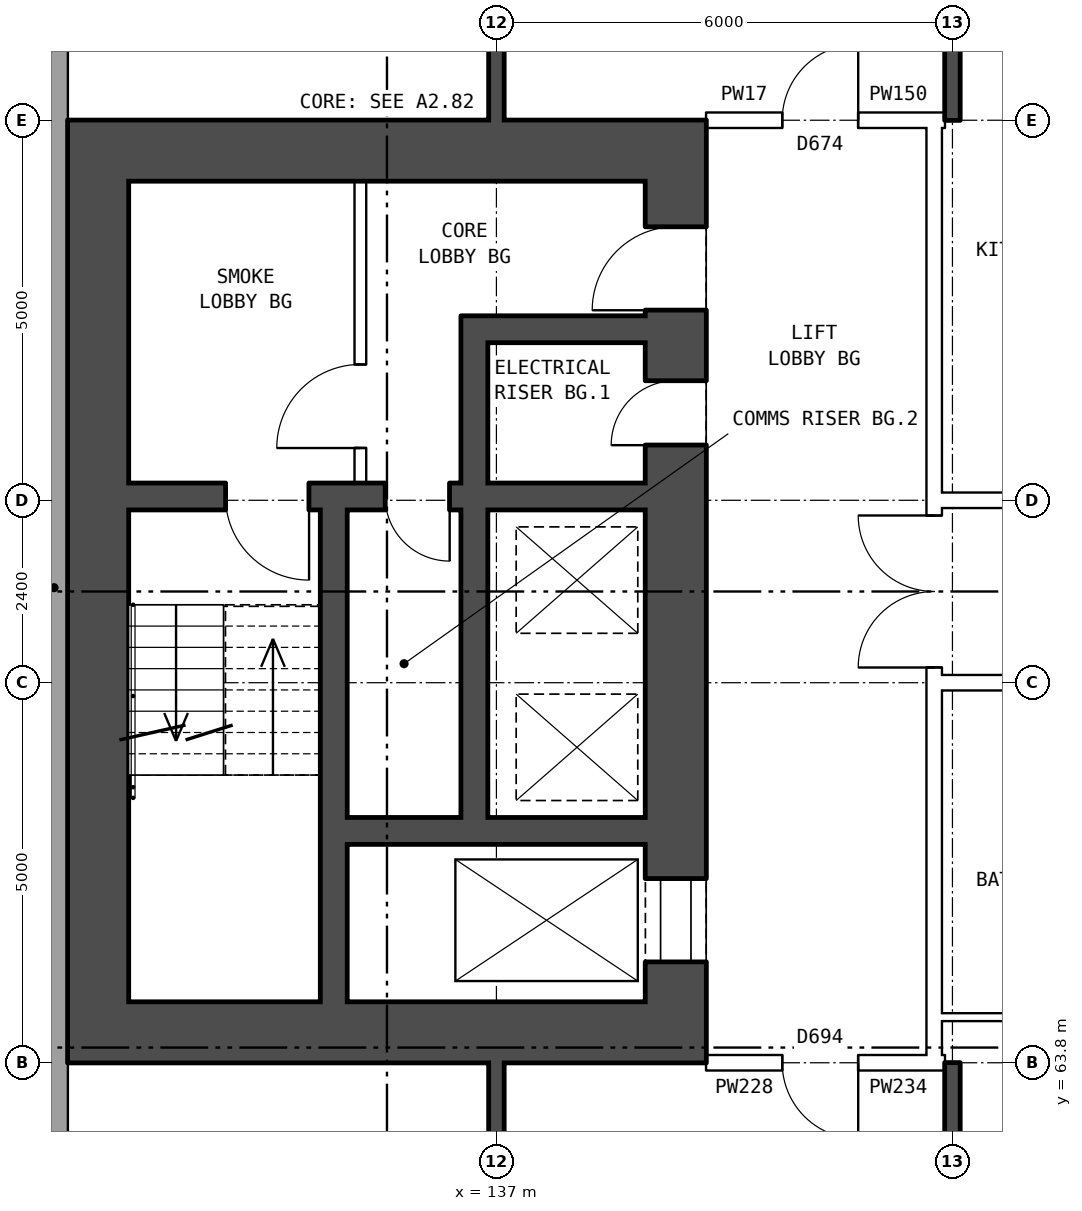
"""IFC4 building model, lengths in metres.
Left out: names, types, materials, properties, quantities, classifications, styles, units other than length and angle.
Written with IfcOpenShell. Run it as: python <this file> out.ifc"""

import sys

from ifc_helpers import new_model, si_unit, direction, frame, frame_2d, origin, place, context, subcontext, project, spatial, rectangle, extrude, element, fill, save


model = new_model("IFC4")
c1 = context("Model", 3, precision=1e-05, world=origin(), true_north=direction((0.0, 1.0)))
c2 = subcontext(c1, "Body", "Model", "MODEL_VIEW")
j1 = project(units=[si_unit("LENGTHUNIT", "METRE"), si_unit("PLANEANGLEUNIT", "RADIAN")], contexts=[c1])
p1 = place(None, origin())
s1 = spatial("IfcSite", under=j1, at=p1, CompositionType="ELEMENT")
p2 = place(p1, origin())
s2 = spatial("IfcBuilding", under=s1, at=p2, CompositionType="ELEMENT")
p3 = place(p2, frame((0.0, 0.0, 47.4)))
s3 = spatial("IfcBuildingStorey", under=s2, at=p3, CompositionType="ELEMENT", Elevation=47.4)
p4 = place(p3, frame((131.18, 82.925, 0.0), z_axis=(0.0, 0.0, 1.0), x_axis=(0.0, -1.0, 0.0)))
e1 = element("IfcWall", 1, at=p4, inside=s3, PredefinedType="STANDARD", context=c2, shape_type="SweptSolid", body=[
    extrude(rectangle(XDim=25.851, YDim=0.36, at=frame_2d((12.925, 0.0))), origin(), (0.0, 0.0, 1.0), 2.85),
])
p5 = place(p4, frame((1.625, 0.0, 0.8)))
e2 = element("IfcOpeningElement", 2, at=p5, cuts=e1, PredefinedType="OPENING", context=c2, shape_type="SweptSolid", body=[
    extrude(rectangle(XDim=1.6, YDim=1.8, at=frame_2d((0.8, 0.9))), frame((0.0, 0.19, 0.0), z_axis=(0.0, -1.0, 0.0), x_axis=(1.0, 0.0, 0.0)), (0.0, 0.0, 1.0), 0.38),
])
p6 = place(p4, frame((3.525, 0.0, 1.7)))
e3 = element("IfcOpeningElement", 3, at=p6, cuts=e1, PredefinedType="OPENING", context=c2, shape_type="SweptSolid", body=[
    extrude(rectangle(XDim=1.4, YDim=0.9, at=frame_2d((0.7, 0.45))), frame((0.0, 0.19, 0.0), z_axis=(0.0, -1.0, 0.0), x_axis=(1.0, 0.0, 0.0)), (0.0, 0.0, 1.0), 0.38),
])
p7 = place(p4, frame((20.825, 0.0, 1.7)))
e4 = element("IfcOpeningElement", 4, at=p7, cuts=e1, PredefinedType="OPENING", context=c2, shape_type="SweptSolid", body=[
    extrude(rectangle(XDim=1.4, YDim=0.9, at=frame_2d((0.7, 0.45))), frame((0.0, 0.19, 0.0), z_axis=(0.0, -1.0, 0.0), x_axis=(1.0, 0.0, 0.0)), (0.0, 0.0, 1.0), 0.38),
])
p8 = place(p4, frame((22.625, 0.0, 0.8)))
e5 = element("IfcOpeningElement", 5, at=p8, cuts=e1, PredefinedType="OPENING", context=c2, shape_type="SweptSolid", body=[
    extrude(rectangle(XDim=1.6, YDim=1.8, at=frame_2d((0.8, 0.9))), frame((0.0, 0.19, 0.0), z_axis=(0.0, -1.0, 0.0), x_axis=(1.0, 0.0, 0.0)), (0.0, 0.0, 1.0), 0.38),
])
p9 = place(p3, frame((139.36, 64.6, 0.0), z_axis=(0.0, 0.0, 1.0), x_axis=(0.0, 1.0, 0.0)))
e6 = element("IfcWall", 6, at=p9, inside=s3, PredefinedType="SHEAR", context=c2, shape_type="SweptSolid", body=[
    extrude(rectangle(XDim=10.8, YDim=0.8, at=frame_2d((5.4, 0.0))), origin(), (0.0, 0.0, 1.0), 2.85),
])
p10 = place(p9, frame((0.525, 0.0, 0.0)))
e7 = element("IfcOpeningElement", 7, at=p10, cuts=e6, PredefinedType="OPENING", context=c2, shape_type="SweptSolid", body=[
    extrude(rectangle(XDim=1.1, YDim=2.1, at=frame_2d((0.55, 1.05))), frame((0.0, 0.41, 0.0), z_axis=(0.0, -1.0, 0.0), x_axis=(1.0, 0.0, 0.0)), (0.0, 0.0, 1.0), 0.82),
])
p11 = place(p9, frame((9.1, 0.0, 0.0)))
e8 = element("IfcOpeningElement", 8, at=p11, cuts=e6, PredefinedType="OPENING", context=c2, shape_type="SweptSolid", body=[
    extrude(rectangle(XDim=1.1, YDim=2.1, at=frame_2d((0.55, 1.05))), frame((0.0, 0.41, 0.0), z_axis=(0.0, -1.0, 0.0), x_axis=(1.0, 0.0, 0.0)), (0.0, 0.0, 1.0), 0.82),
])
p12 = place(p9, frame((7.325, 0.0, 0.0)))
e9 = element("IfcOpeningElement", 9, at=p12, cuts=e6, PredefinedType="OPENING", context=c2, shape_type="SweptSolid", body=[
    extrude(rectangle(XDim=0.85, YDim=2.1, at=frame_2d((0.425, 1.05))), frame((0.0, 0.41, 0.0), z_axis=(0.0, -1.0, 0.0), x_axis=(1.0, 0.0, 0.0)), (0.0, 0.0, 1.0), 0.82),
])
p13 = place(p3, frame((131.76, 64.6, 0.0), z_axis=(0.0, 0.0, 1.0), x_axis=(0.0, 1.0, 0.0)))
e10 = element("IfcWall", 10, at=p13, inside=s3, PredefinedType="SHEAR", context=c2, shape_type="SweptSolid", body=[
    extrude(rectangle(XDim=10.8, YDim=0.8, at=frame_2d((5.4, 0.0))), origin(), (0.0, 0.0, 1.0), 2.85),
])
for number, where, z_axis, x_axis in (
    (11, (139.76, 64.2, 0.0), (0.0, 0.0, 1.0), (-1.0, 0.0, 0.0)),
    (12, (139.76, 75.8, 0.0), (0.0, 0.0, 1.0), (-1.0, 0.0, 0.0)),
):
    element("IfcWall", number, at=place(p3, frame(where, z_axis=z_axis, x_axis=x_axis)), inside=s3, PredefinedType="SHEAR", context=c2, shape_type="SweptSolid", body=[
        extrude(rectangle(XDim=8.4, YDim=0.8, at=frame_2d((4.2, 0.0))), origin(), (0.0, 0.0, 1.0), 2.85),
    ])
p14 = place(p3, frame((138.96, 66.85, 0.0), z_axis=(0.0, 0.0, 1.0), x_axis=(-1.0, 0.0, 0.0)))
e13 = element("IfcWall", 13, at=p14, inside=s3, PredefinedType="SHEAR", context=c2, shape_type="SweptSolid", body=[
    extrude(rectangle(XDim=3.925, YDim=0.35, at=frame_2d((1.962, 0.0))), origin(), (0.0, 0.0, 1.0), 2.85),
])
p15 = place(p3, frame((138.96, 71.25, 0.0), z_axis=(0.0, 0.0, 1.0), x_axis=(-1.0, 0.0, 0.0)))
e14 = element("IfcWall", 14, at=p15, inside=s3, PredefinedType="SHEAR", context=c2, shape_type="SweptSolid", body=[
    extrude(rectangle(XDim=6.8, YDim=0.35, at=frame_2d((3.4, 0.0))), origin(), (0.0, 0.0, 1.0), 2.85),
])
p16 = place(p15, frame((4.425, 0.0, 0.0)))
e15 = element("IfcOpeningElement", 15, at=p16, cuts=e14, PredefinedType="OPENING", context=c2, shape_type="SweptSolid", body=[
    extrude(rectangle(XDim=1.1, YDim=2.1, at=frame_2d((0.55, 1.05))), frame((0.0, 0.185, 0.0), z_axis=(0.0, -1.0, 0.0), x_axis=(1.0, 0.0, 0.0)), (0.0, 0.0, 1.0), 0.37),
])
p17 = place(p15, frame((2.575, 0.0, 0.0)))
e16 = element("IfcOpeningElement", 16, at=p17, cuts=e14, PredefinedType="OPENING", context=c2, shape_type="SweptSolid", body=[
    extrude(rectangle(XDim=0.85, YDim=2.1, at=frame_2d((0.425, 1.05))), frame((0.0, 0.185, 0.0), z_axis=(0.0, -1.0, 0.0), x_axis=(1.0, 0.0, 0.0)), (0.0, 0.0, 1.0), 0.37),
])
p18 = place(p3, frame((138.96, 73.45, 0.0), z_axis=(0.0, 0.0, 1.0), x_axis=(-1.0, 0.0, 0.0)))
e17 = element("IfcWall", 17, at=p18, inside=s3, PredefinedType="SHEAR", context=c2, shape_type="SweptSolid", body=[
    extrude(rectangle(XDim=2.075, YDim=0.35, at=frame_2d((1.038, 0.0))), origin(), (0.0, 0.0, 1.0), 2.85),
])
p19 = place(p3, frame((136.71, 67.025, 0.0), z_axis=(0.0, 0.0, 1.0), x_axis=(0.0, 1.0, 0.0)))
e18 = element("IfcWall", 18, at=p19, inside=s3, PredefinedType="SHEAR", context=c2, shape_type="SweptSolid", body=[
    extrude(rectangle(XDim=4.05, YDim=0.35, at=frame_2d((2.025, 0.0))), origin(), (0.0, 0.0, 1.0), 2.85),
])
p20 = place(p3, frame((136.71, 71.425, 0.0), z_axis=(0.0, 0.0, 1.0), x_axis=(0.0, 1.0, 0.0)))
e19 = element("IfcWall", 19, at=p20, inside=s3, PredefinedType="SHEAR", context=c2, shape_type="SweptSolid", body=[
    extrude(rectangle(XDim=2.2, YDim=0.35, at=frame_2d((1.1, 0.0))), origin(), (0.0, 0.0, 1.0), 2.85),
])
p21 = place(p3, frame((135.21, 71.425, 0.0), z_axis=(0.0, 0.0, 1.0), x_axis=(0.0, 1.0, 0.0)))
e20 = element("IfcWall", 20, at=p21, inside=s3, PredefinedType="PARTITIONING", context=c2, shape_type="SweptSolid", body=[
    extrude(rectangle(XDim=3.975, YDim=0.15, at=frame_2d((1.987, 0.0))), origin(), (0.0, 0.0, 1.0), 2.85),
])
p22 = place(p21, frame((0.462, 0.0, 0.0)))
e21 = element("IfcOpeningElement", 21, at=p22, cuts=e20, PredefinedType="OPENING", context=c2, shape_type="SweptSolid", body=[
    extrude(rectangle(XDim=1.1, YDim=2.1, at=frame_2d((0.55, 1.05))), frame((0.0, 0.085, 0.0), z_axis=(0.0, -1.0, 0.0), x_axis=(1.0, 0.0, 0.0)), (0.0, 0.0, 1.0), 0.17),
])
p23 = place(p3, frame((134.86, 64.6, 0.0), z_axis=(0.0, 0.0, 1.0), x_axis=(0.0, 1.0, 0.0)))
e22 = element("IfcWall", 22, at=p23, inside=s3, PredefinedType="SHEAR", context=c2, shape_type="SweptSolid", body=[
    extrude(rectangle(XDim=6.475, YDim=0.35, at=frame_2d((3.237, 0.0))), origin(), (0.0, 0.0, 1.0), 2.85),
])
p24 = place(p3, frame((142.76, 63.9, 0.0), z_axis=(0.0, 0.0, 1.0), x_axis=(0.0, 1.0, 0.0)))
e23 = element("IfcWall", 23, at=p24, inside=s3, PredefinedType="PARTITIONING", context=c2, shape_type="SweptSolid", body=[
    extrude(rectangle(XDim=12.2, YDim=0.2, at=frame_2d((6.1, 0.0))), origin(), (0.0, 0.0, 1.0), 2.85),
])
p25 = place(p24, frame((5.1, 0.0, 0.0)))
e24 = element("IfcOpeningElement", 24, at=p25, cuts=e23, PredefinedType="OPENING", context=c2, shape_type="SweptSolid", body=[
    extrude(rectangle(XDim=2.0, YDim=2.1, at=frame_2d((1.0, 1.05))), frame((0.0, 0.11, 0.0), z_axis=(0.0, -1.0, 0.0), x_axis=(1.0, 0.0, 0.0)), (0.0, 0.0, 1.0), 0.22),
])
p26 = place(p3, frame((139.76, 63.8, 0.0), z_axis=(0.0, 0.0, 1.0), x_axis=(1.0, 0.0, 0.0)))
e25 = element("IfcWall", 25, at=p26, inside=s3, PredefinedType="PARTITIONING", context=c2, shape_type="SweptSolid", body=[
    extrude(rectangle(XDim=3.0, YDim=0.2, at=frame_2d((1.5, 0.0))), origin(), (0.0, 0.0, 1.0), 2.85),
])
p27 = place(p26, frame((1.0, 0.0, 0.0)))
e26 = element("IfcOpeningElement", 26, at=p27, cuts=e25, PredefinedType="OPENING", context=c2, shape_type="SweptSolid", body=[
    extrude(rectangle(XDim=1.0, YDim=2.1, at=frame_2d((0.5, 1.05))), frame((0.0, 0.11, 0.0), z_axis=(0.0, -1.0, 0.0), x_axis=(1.0, 0.0, 0.0)), (0.0, 0.0, 1.0), 0.22),
])
p28 = place(p3, frame((142.76, 63.8, 0.0), z_axis=(0.0, 0.0, 1.0), x_axis=(1.0, 0.0, 0.0)))
e27 = element("IfcWall", 27, at=p28, inside=s3, PredefinedType="PARTITIONING", context=c2, shape_type="SweptSolid", body=[
    extrude(rectangle(XDim=0.14, YDim=0.2, at=frame_2d((0.07, 0.0))), origin(), (0.0, 0.0, 1.0), 2.85),
])
p29 = place(p3, frame((142.76, 64.4, 0.0), z_axis=(0.0, 0.0, 1.0), x_axis=(1.0, 0.0, 0.0)))
e28 = element("IfcWall", 28, at=p29, inside=s3, PredefinedType="PARTITIONING", context=c2, shape_type="SweptSolid", body=[
    extrude(rectangle(XDim=3.24, YDim=0.1, at=frame_2d((1.62, 0.0))), origin(), (0.0, 0.0, 1.0), 2.85),
])
p30 = place(p3, frame((142.76, 68.8, 0.0), z_axis=(0.0, 0.0, 1.0), x_axis=(1.0, 0.0, 0.0)))
e29 = element("IfcWall", 29, at=p30, inside=s3, PredefinedType="PARTITIONING", context=c2, shape_type="SweptSolid", body=[
    extrude(rectangle(XDim=14.48, YDim=0.2, at=frame_2d((7.24, 0.0))), origin(), (0.0, 0.0, 1.0), 2.85),
])
p31 = place(p30, frame((4.24, 0.0, 0.0)))
e30 = element("IfcOpeningElement", 30, at=p31, cuts=e29, PredefinedType="OPENING", context=c2, shape_type="SweptSolid", body=[
    extrude(rectangle(XDim=1.0, YDim=2.1, at=frame_2d((0.5, 1.05))), frame((0.0, 0.11, 0.0), z_axis=(0.0, -1.0, 0.0), x_axis=(1.0, 0.0, 0.0)), (0.0, 0.0, 1.0), 0.22),
])
p32 = place(p30, frame((10.24, 0.0, 0.0)))
e31 = element("IfcOpeningElement", 31, at=p32, cuts=e29, PredefinedType="OPENING", context=c2, shape_type="SweptSolid", body=[
    extrude(rectangle(XDim=1.0, YDim=2.1, at=frame_2d((0.5, 1.05))), frame((0.0, 0.11, 0.0), z_axis=(0.0, -1.0, 0.0), x_axis=(1.0, 0.0, 0.0)), (0.0, 0.0, 1.0), 0.22),
])
p33 = place(p3, frame((142.76, 71.2, 0.0), z_axis=(0.0, 0.0, 1.0), x_axis=(1.0, 0.0, 0.0)))
e32 = element("IfcWall", 32, at=p33, inside=s3, PredefinedType="PARTITIONING", context=c2, shape_type="SweptSolid", body=[
    extrude(rectangle(XDim=14.48, YDim=0.2, at=frame_2d((7.24, 0.0))), origin(), (0.0, 0.0, 1.0), 2.85),
])
p34 = place(p33, frame((1.12, 0.0, 0.0)))
e33 = element("IfcOpeningElement", 33, at=p34, cuts=e32, PredefinedType="OPENING", context=c2, shape_type="SweptSolid", body=[
    extrude(rectangle(XDim=1.0, YDim=2.1, at=frame_2d((0.5, 1.05))), frame((0.0, 0.11, 0.0), z_axis=(0.0, -1.0, 0.0), x_axis=(1.0, 0.0, 0.0)), (0.0, 0.0, 1.0), 0.22),
])
p35 = place(p33, frame((7.24, 0.0, 0.0)))
e34 = element("IfcOpeningElement", 34, at=p35, cuts=e32, PredefinedType="OPENING", context=c2, shape_type="SweptSolid", body=[
    extrude(rectangle(XDim=1.0, YDim=2.1, at=frame_2d((0.5, 1.05))), frame((0.0, 0.11, 0.0), z_axis=(0.0, -1.0, 0.0), x_axis=(1.0, 0.0, 0.0)), (0.0, 0.0, 1.0), 0.22),
])
p36 = place(p3, frame((139.76, 76.2, 0.0), z_axis=(0.0, 0.0, 1.0), x_axis=(1.0, 0.0, 0.0)))
e35 = element("IfcWall", 35, at=p36, inside=s3, PredefinedType="PARTITIONING", context=c2, shape_type="SweptSolid", body=[
    extrude(rectangle(XDim=3.0, YDim=0.2, at=frame_2d((1.5, 0.0))), origin(), (0.0, 0.0, 1.0), 2.85),
])
p37 = place(p36, frame((1.0, 0.0, 0.0)))
e36 = element("IfcOpeningElement", 36, at=p37, cuts=e35, PredefinedType="OPENING", context=c2, shape_type="SweptSolid", body=[
    extrude(rectangle(XDim=1.0, YDim=2.1, at=frame_2d((0.5, 1.05))), frame((0.0, 0.11, 0.0), z_axis=(0.0, -1.0, 0.0), x_axis=(1.0, 0.0, 0.0)), (0.0, 0.0, 1.0), 0.22),
])
p38 = place(p3, frame((142.76, 76.2, 0.0), z_axis=(0.0, 0.0, 1.0), x_axis=(1.0, 0.0, 0.0)))
e37 = element("IfcWall", 37, at=p38, inside=s3, PredefinedType="PARTITIONING", context=c2, shape_type="SweptSolid", body=[
    extrude(rectangle(XDim=0.14, YDim=0.2, at=frame_2d((0.07, 0.0))), origin(), (0.0, 0.0, 1.0), 2.85),
])
p39 = place(p3, frame((137.0, 54.36, 0.0), z_axis=(0.0, 0.0, 1.0), x_axis=(0.0, 1.0, 0.0)))
e38 = element("IfcWall", 38, at=p39, inside=s3, PredefinedType="SOLIDWALL", context=c2, shape_type="SweptSolid", body=[
    extrude(rectangle(XDim=9.44, YDim=0.2, at=frame_2d((4.72, 0.0))), origin(), (0.0, 0.0, 1.0), 2.85),
])
p40 = place(p39, frame((7.04, 0.0, 0.0)))
e39 = element("IfcOpeningElement", 39, at=p40, cuts=e38, PredefinedType="OPENING", context=c2, shape_type="SweptSolid", body=[
    extrude(rectangle(XDim=0.9, YDim=2.1, at=frame_2d((0.45, 1.05))), frame((0.0, 0.11, 0.0), z_axis=(0.0, -1.0, 0.0), x_axis=(1.0, 0.0, 0.0)), (0.0, 0.0, 1.0), 0.22),
])
p41 = place(p3, frame((137.0, 76.2, 0.0), z_axis=(0.0, 0.0, 1.0), x_axis=(0.0, 1.0, 0.0)))
e40 = element("IfcWall", 40, at=p41, inside=s3, PredefinedType="SOLIDWALL", context=c2, shape_type="SweptSolid", body=[
    extrude(rectangle(XDim=9.44, YDim=0.2, at=frame_2d((4.72, 0.0))), origin(), (0.0, 0.0, 1.0), 2.85),
])
p42 = place(p41, frame((1.2, 0.0, 0.0)))
e41 = element("IfcOpeningElement", 41, at=p42, cuts=e40, PredefinedType="OPENING", context=c2, shape_type="SweptSolid", body=[
    extrude(rectangle(XDim=0.9, YDim=2.1, at=frame_2d((0.45, 1.05))), frame((0.0, 0.11, 0.0), z_axis=(0.0, -1.0, 0.0), x_axis=(1.0, 0.0, 0.0)), (0.0, 0.0, 1.0), 0.22),
])
for number, where, z_axis, x_axis in (
    (42, (143.0, 54.36, 0.0), (0.0, 0.0, 1.0), (0.0, 1.0, 0.0)),
    (43, (143.0, 76.2, 0.0), (0.0, 0.0, 1.0), (0.0, 1.0, 0.0)),
):
    element("IfcWall", number, at=place(p3, frame(where, z_axis=z_axis, x_axis=x_axis)), inside=s3, PredefinedType="SOLIDWALL", context=c2, shape_type="SweptSolid", body=[
        extrude(rectangle(XDim=9.44, YDim=0.2, at=frame_2d((4.72, 0.0))), origin(), (0.0, 0.0, 1.0), 2.85),
    ])
p43 = place(p10, origin())
e44 = element("IfcDoor", 44, at=p43, inside=s3, OperationType="DOUBLE_DOOR_SLIDING", PredefinedType="DOOR", context=c2, shape_type="SweptSolid", body=[
    extrude(rectangle(XDim=1.1, YDim=2.1, at=frame_2d((0.55, 1.05))), frame((0.0, 0.385, 0.0), z_axis=(0.0, -1.0, 0.0), x_axis=(1.0, 0.0, 0.0)), (0.0, 0.0, 1.0), 0.05),
])
fill(e7, e44)
p44 = place(p11, origin())
e45 = element("IfcDoor", 45, at=p44, inside=s3, OperationType="SINGLE_SWING_LEFT", PredefinedType="DOOR", context=c2, shape_type="SweptSolid", body=[
    extrude(rectangle(XDim=1.1, YDim=2.1, at=frame_2d((0.55, 1.05))), frame((0.0, 0.385, 0.0), z_axis=(0.0, -1.0, 0.0), x_axis=(1.0, 0.0, 0.0)), (0.0, 0.0, 1.0), 0.05),
])
fill(e8, e45)
p45 = place(p22, origin())
e46 = element("IfcDoor", 46, at=p45, inside=s3, OperationType="SINGLE_SWING_LEFT", PredefinedType="DOOR", context=c2, shape_type="SweptSolid", body=[
    extrude(rectangle(XDim=1.1, YDim=2.1, at=frame_2d((0.55, 1.05))), frame((0.0, 0.025, 0.0), z_axis=(0.0, -1.0, 0.0), x_axis=(1.0, 0.0, 0.0)), (0.0, 0.0, 1.0), 0.05),
])
fill(e21, e46)
p46 = place(p16, origin())
e47 = element("IfcDoor", 47, at=p46, inside=s3, OperationType="SINGLE_SWING_LEFT", PredefinedType="DOOR", context=c2, shape_type="SweptSolid", body=[
    extrude(rectangle(XDim=1.1, YDim=2.1, at=frame_2d((0.55, 1.05))), frame((0.0, 0.025, 0.0), z_axis=(0.0, -1.0, 0.0), x_axis=(1.0, 0.0, 0.0)), (0.0, 0.0, 1.0), 0.05),
])
fill(e15, e47)
p47 = place(p12, origin())
e48 = element("IfcDoor", 48, at=p47, inside=s3, OperationType="SINGLE_SWING_LEFT", PredefinedType="DOOR", context=c2, shape_type="SweptSolid", body=[
    extrude(rectangle(XDim=0.85, YDim=2.1, at=frame_2d((0.425, 1.05))), frame((0.0, 0.385, 0.0), z_axis=(0.0, -1.0, 0.0), x_axis=(1.0, 0.0, 0.0)), (0.0, 0.0, 1.0), 0.05),
])
fill(e9, e48)
p48 = place(p17, origin())
e49 = element("IfcDoor", 49, at=p48, inside=s3, OperationType="SINGLE_SWING_LEFT", PredefinedType="DOOR", context=c2, shape_type="SweptSolid", body=[
    extrude(rectangle(XDim=0.85, YDim=2.1, at=frame_2d((0.425, 1.05))), frame((0.0, 0.025, 0.0), z_axis=(0.0, -1.0, 0.0), x_axis=(1.0, 0.0, 0.0)), (0.0, 0.0, 1.0), 0.05),
])
fill(e16, e49)
p49 = place(p25, origin())
e50 = element("IfcDoor", 50, at=p49, inside=s3, OperationType="DOUBLE_DOOR_SINGLE_SWING", PredefinedType="DOOR", context=c2, shape_type="SweptSolid", body=[
    extrude(rectangle(XDim=2.0, YDim=2.1, at=frame_2d((1.0, 1.05))), frame((0.0, 0.025, 0.0), z_axis=(0.0, -1.0, 0.0), x_axis=(1.0, 0.0, 0.0)), (0.0, 0.0, 1.0), 0.05),
])
fill(e24, e50)
p50 = place(p27, frame((1.0, 0.0, 0.0), z_axis=(0.0, 0.0, 1.0), x_axis=(-1.0, 0.0, 0.0)))
e51 = element("IfcDoor", 51, at=p50, inside=s3, OperationType="SINGLE_SWING_LEFT", PredefinedType="DOOR", context=c2, shape_type="SweptSolid", body=[
    extrude(rectangle(XDim=1.0, YDim=2.1, at=frame_2d((0.5, 1.05))), frame((0.0, 0.025, 0.0), z_axis=(0.0, -1.0, 0.0), x_axis=(1.0, 0.0, 0.0)), (0.0, 0.0, 1.0), 0.05),
])
fill(e26, e51)
p51 = place(p37, origin())
e52 = element("IfcDoor", 52, at=p51, inside=s3, OperationType="SINGLE_SWING_RIGHT", PredefinedType="DOOR", context=c2, shape_type="SweptSolid", body=[
    extrude(rectangle(XDim=1.0, YDim=2.1, at=frame_2d((0.5, 1.05))), frame((0.0, 0.025, 0.0), z_axis=(0.0, -1.0, 0.0), x_axis=(1.0, 0.0, 0.0)), (0.0, 0.0, 1.0), 0.05),
])
fill(e36, e52)
save(model, sys.argv[1])
